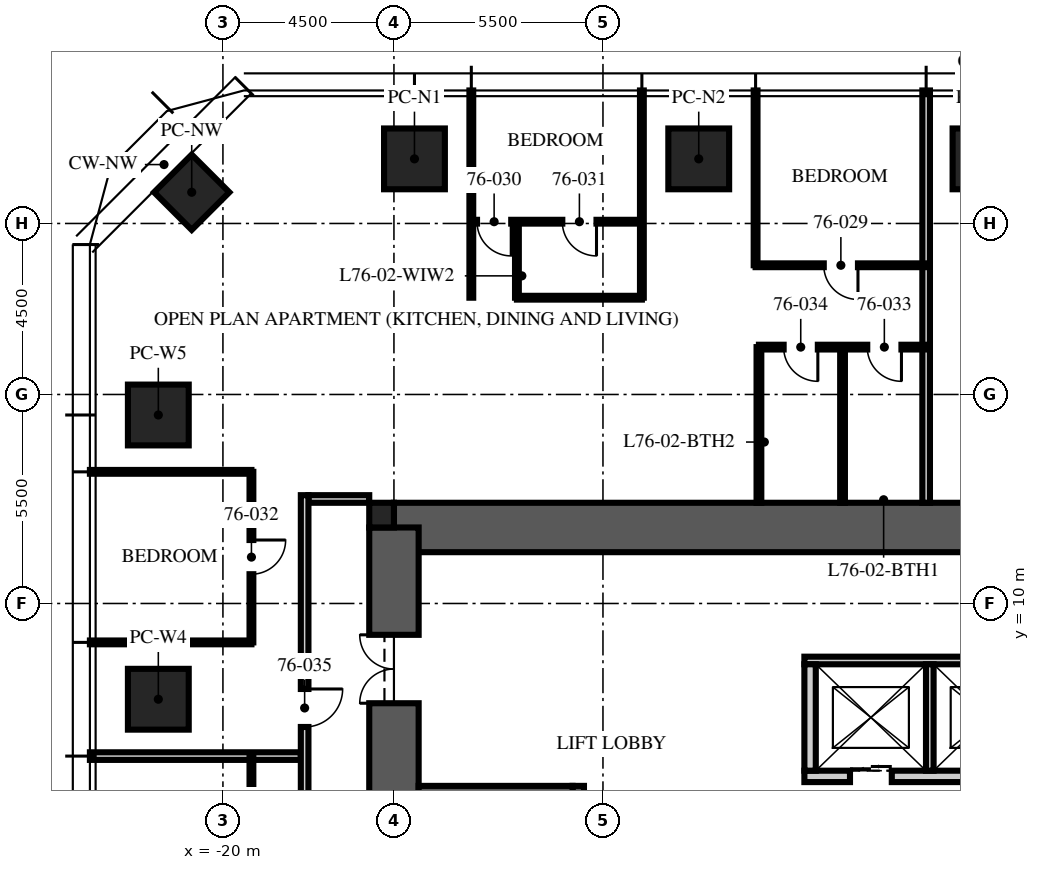
"""IFC4 building model, lengths in metres.
Left out: names, types, materials, properties, quantities, classifications, styles, units other than length and angle.
Written with IfcOpenShell. Run it as: python <this file> out.ifc"""

import sys

from ifc_helpers import new_model, si_unit, direction, frame, frame_2d, origin, origin_2d, place, context, subcontext, project, spatial, rectangle, extrude, element, fill, save


model = new_model("IFC4")
c1 = context("Model", 3, precision=1e-05, world=origin(), true_north=direction((0.0, 1.0)))
c2 = subcontext(c1, "Body", "Model", "MODEL_VIEW")
j1 = project(units=[si_unit("LENGTHUNIT", "METRE"), si_unit("PLANEANGLEUNIT", "RADIAN")], contexts=[c1])
p1 = place(None, origin())
s1 = spatial("IfcSite", under=j1, at=p1, CompositionType="ELEMENT")
p2 = place(p1, origin())
s2 = spatial("IfcBuilding", under=s1, at=p2, CompositionType="ELEMENT")
p3 = place(p2, frame((0.0, 0.0, 304.5)))
s3 = spatial("IfcBuildingStorey", under=s2, at=p3, CompositionType="ELEMENT", Elevation=304.5)
p4 = place(p3, frame((-15.5, 12.0, -0.25), z_axis=(0.0, 0.0, 1.0), x_axis=(1.0, 0.0, 0.0)))
e1 = element("IfcWall", 1, at=p4, inside=s3, PredefinedType="SHEAR", context=c2, shape_type="SweptSolid", body=[
    extrude(rectangle(XDim=31.0, YDim=1.3, at=frame_2d((15.5, 0.0))), origin(), (0.0, 0.0, 1.0), 3.75),
])
p5 = place(p3, frame((-15.5, -12.0, -0.25), z_axis=(0.0, 0.0, 1.0), x_axis=(0.0, 1.0, 0.0)))
e2 = element("IfcWall", 2, at=p5, inside=s3, PredefinedType="SHEAR", context=c2, shape_type="SweptSolid", body=[
    extrude(rectangle(XDim=24.0, YDim=1.3, at=frame_2d((12.0, 0.0))), origin(), (0.0, 0.0, 1.0), 3.75),
])
p6 = place(p5, frame((3.125, 0.0, 0.25)))
e3 = element("IfcOpeningElement", 3, at=p6, cuts=e2, PredefinedType="OPENING", context=c2, shape_type="SweptSolid", body=[
    extrude(rectangle(XDim=1.2, YDim=2.1, at=frame_2d((0.6, 1.05))), frame((0.0, 0.66, 0.0), z_axis=(0.0, -1.0, 0.0), x_axis=(1.0, 0.0, 0.0)), (0.0, 0.0, 1.0), 1.32),
])
p7 = place(p5, frame((19.375, 0.0, 0.25)))
e4 = element("IfcOpeningElement", 4, at=p7, cuts=e2, PredefinedType="OPENING", context=c2, shape_type="SweptSolid", body=[
    extrude(rectangle(XDim=1.8, YDim=2.1, at=frame_2d((0.9, 1.05))), frame((0.0, 0.66, 0.0), z_axis=(0.0, -1.0, 0.0), x_axis=(1.0, 0.0, 0.0)), (0.0, 0.0, 1.0), 1.32),
])
p8 = place(p3, frame((-15.825, 12.325, -0.25), z_axis=(0.0, 0.0, 1.0), x_axis=(1.0, 0.0, 0.0)))
e5 = element("IfcColumn", 5, at=p8, inside=s3, PredefinedType="COLUMN", context=c2, shape_type="SweptSolid", body=[
    extrude(rectangle(XDim=0.65, YDim=0.65, at=origin_2d()), origin(), (0.0, 0.0, 1.0), 3.75),
])
for number, where, z_axis, x_axis in (
    (6, (-14.96, 21.7, 0.0), (0.0, 0.0, 1.0), (1.0, 0.0, 0.0)),
    (7, (-7.48, 21.7, 0.0), (0.0, 0.0, 1.0), (1.0, 0.0, 0.0)),
    (8, (0.0, 21.7, 0.0), (0.0, 0.0, 1.0), (1.0, 0.0, 0.0)),
    (9, (-21.7, 7.48, 0.0), (0.0, 0.0, 1.0), (0.0, 1.0, 0.0)),
    (10, (-21.7, 14.96, 0.0), (0.0, 0.0, 1.0), (0.0, 1.0, 0.0)),
):
    element("IfcColumn", number, at=place(p3, frame(where, z_axis=z_axis, x_axis=x_axis)), inside=s3, PredefinedType="COLUMN", context=c2, shape_type="SweptSolid", body=[
        extrude(rectangle(XDim=1.6, YDim=1.6, at=origin_2d()), origin(), (0.0, 0.0, 1.0), 3.75),
    ])
p9 = place(p3, frame((-20.821, 20.821, 0.0), z_axis=(0.0, 0.0, 1.0), x_axis=(0.707106781187, 0.707106781187, 0.0)))
e11 = element("IfcColumn", 11, at=p9, inside=s3, PredefinedType="COLUMN", context=c2, shape_type="SweptSolid", body=[
    extrude(rectangle(XDim=1.4, YDim=1.4, at=origin_2d()), origin(), (0.0, 0.0, 1.0), 3.75),
])
p10 = place(p3, frame((-10.65, -4.9, 0.0), z_axis=(0.0, 0.0, 1.0), x_axis=(0.0, 1.0, 0.0)))
e12 = element("IfcWall", 12, at=p10, inside=s3, PredefinedType="SOLIDWALL", context=c2, shape_type="SweptSolid", body=[
    extrude(rectangle(XDim=10.1, YDim=0.3, at=frame_2d((5.05, 0.0))), origin(), (0.0, 0.0, 1.0), 3.5),
])
p11 = place(p3, frame((-14.85, 5.05, 0.0), z_axis=(0.0, 0.0, 1.0), x_axis=(1.0, 0.0, 0.0)))
e13 = element("IfcWall", 13, at=p11, inside=s3, PredefinedType="SOLIDWALL", context=c2, shape_type="SweptSolid", body=[
    extrude(rectangle(XDim=4.05, YDim=0.3, at=frame_2d((2.025, 0.0))), origin(), (0.0, 0.0, 1.0), 3.5),
])
p12 = place(p3, frame((-4.7, 5.45, 0.0), z_axis=(0.0, 0.0, 1.0), x_axis=(1.0, 0.0, 0.0)))
e14 = element("IfcWall", 14, at=p12, inside=s3, PredefinedType="PARTITIONING", context=c2, shape_type="SweptSolid", body=[
    extrude(rectangle(XDim=9.7, YDim=0.3, at=frame_2d((4.85, 0.0))), origin(), (0.0, 0.0, 1.0), 3.5),
])
p13 = place(p12, frame((1.2, 0.0, 0.0)))
e15 = element("IfcOpeningElement", 15, at=p13, cuts=e14, PredefinedType="OPENING", context=c2, shape_type="SweptSolid", body=[
    extrude(rectangle(XDim=1.1, YDim=2.1, at=frame_2d((0.55, 1.05))), frame((0.0, 0.16, 0.0), z_axis=(0.0, -1.0, 0.0), x_axis=(1.0, 0.0, 0.0)), (0.0, 0.0, 1.0), 0.32),
])
p14 = place(p12, frame((4.3, 0.0, 0.0)))
e16 = element("IfcOpeningElement", 16, at=p14, cuts=e14, PredefinedType="OPENING", context=c2, shape_type="SweptSolid", body=[
    extrude(rectangle(XDim=1.1, YDim=2.1, at=frame_2d((0.55, 1.05))), frame((0.0, 0.16, 0.0), z_axis=(0.0, -1.0, 0.0), x_axis=(1.0, 0.0, 0.0)), (0.0, 0.0, 1.0), 0.32),
])
p15 = place(p12, frame((7.4, 0.0, 0.0)))
e17 = element("IfcOpeningElement", 17, at=p15, cuts=e14, PredefinedType="OPENING", context=c2, shape_type="SweptSolid", body=[
    extrude(rectangle(XDim=1.1, YDim=2.1, at=frame_2d((0.55, 1.05))), frame((0.0, 0.16, 0.0), z_axis=(0.0, -1.0, 0.0), x_axis=(1.0, 0.0, 0.0)), (0.0, 0.0, 1.0), 0.32),
])
p16 = place(p3, frame((-4.7, 8.5, 0.0), z_axis=(0.0, 0.0, 1.0), x_axis=(1.0, 0.0, 0.0)))
e18 = element("IfcWall", 18, at=p16, inside=s3, PredefinedType="PARTITIONING", context=c2, shape_type="SweptSolid", body=[
    extrude(rectangle(XDim=9.7, YDim=0.2, at=frame_2d((4.85, 0.0))), origin(), (0.0, 0.0, 1.0), 3.5),
])
p17 = place(p3, frame((-4.55, 5.6, 0.0), z_axis=(0.0, 0.0, 1.0), x_axis=(0.0, 1.0, 0.0)))
e19 = element("IfcWall", 19, at=p17, inside=s3, PredefinedType="PARTITIONING", context=c2, shape_type="SweptSolid", body=[
    extrude(rectangle(XDim=2.8, YDim=0.3, at=frame_2d((1.4, 0.0))), origin(), (0.0, 0.0, 1.0), 3.5),
])
p18 = place(p3, frame((-1.4, 5.6, 0.0), z_axis=(0.0, 0.0, 1.0), x_axis=(0.0, 1.0, 0.0)))
e20 = element("IfcWall", 20, at=p18, inside=s3, PredefinedType="PARTITIONING", context=c2, shape_type="SweptSolid", body=[
    extrude(rectangle(XDim=2.8, YDim=0.2, at=frame_2d((1.4, 0.0))), origin(), (0.0, 0.0, 1.0), 3.5),
])
p19 = place(p3, frame((-16.15, 12.75, 0.0), z_axis=(0.0, 0.0, 1.0), x_axis=(-1.0, 0.0, 0.0)))
e21 = element("IfcWall", 21, at=p19, inside=s3, PredefinedType="PARTITIONING", context=c2, shape_type="SweptSolid", body=[
    extrude(rectangle(XDim=1.6, YDim=0.2, at=frame_2d((0.8, 0.0))), origin(), (0.0, 0.0, 1.0), 2.6),
])
p20 = place(p3, frame((-1.496, 12.65, 0.0), z_axis=(0.0, 0.0, 1.0), x_axis=(0.0, 1.0, 0.0)))
e22 = element("IfcWall", 22, at=p20, inside=s3, PredefinedType="PARTITIONING", context=c2, shape_type="SweptSolid", body=[
    extrude(rectangle(XDim=10.85, YDim=0.2, at=frame_2d((5.425, 0.0))), origin(), (0.0, 0.0, 1.0), 3.01),
])
p21 = place(p3, frame((-5.984, 18.9, 0.0), z_axis=(0.0, 0.0, 1.0), x_axis=(0.0, 1.0, 0.0)))
e23 = element("IfcWall", 23, at=p21, inside=s3, PredefinedType="PARTITIONING", context=c2, shape_type="SweptSolid", body=[
    extrude(rectangle(XDim=4.6, YDim=0.1, at=frame_2d((2.3, 0.0))), origin(), (0.0, 0.0, 1.0), 3.01),
])
for number, where, z_axis, x_axis in (
    (24, (-8.976, 18.046, 0.0), (0.0, 0.0, 1.0), (0.0, 1.0, 0.0)),
    (25, (-13.464, 18.046, 0.0), (0.0, 0.0, 1.0), (0.0, 1.0, 0.0)),
):
    element("IfcWall", number, at=place(p3, frame(where, z_axis=z_axis, x_axis=x_axis)), inside=s3, PredefinedType="PARTITIONING", context=c2, shape_type="SweptSolid", body=[
        extrude(rectangle(XDim=5.454, YDim=0.1, at=frame_2d((2.727, 0.0))), origin(), (0.0, 0.0, 1.0), 3.01),
    ])
for number, where, z_axis, x_axis in (
    (26, (-19.25, 13.464, 0.0), (0.0, 0.0, 1.0), (-1.0, 0.0, 0.0)),
    (27, (-19.25, 8.976, 0.0), (0.0, 0.0, 1.0), (-1.0, 0.0, 0.0)),
):
    element("IfcWall", number, at=place(p3, frame(where, z_axis=z_axis, x_axis=x_axis)), inside=s3, PredefinedType="PARTITIONING", context=c2, shape_type="SweptSolid", body=[
        extrude(rectangle(XDim=4.25, YDim=0.1, at=frame_2d((2.125, 0.0))), origin(), (0.0, 0.0, 1.0), 3.01),
    ])
p22 = place(p3, frame((-17.95, 5.984, 0.0), z_axis=(0.0, 0.0, 1.0), x_axis=(-1.0, 0.0, 0.0)))
e28 = element("IfcWall", 28, at=p22, inside=s3, PredefinedType="PARTITIONING", context=c2, shape_type="SweptSolid", body=[
    extrude(rectangle(XDim=5.55, YDim=0.2, at=frame_2d((2.775, 0.0))), origin(), (0.0, 0.0, 1.0), 3.01),
])
p23 = place(p3, frame((-1.496, 18.9, 0.0), z_axis=(0.0, 0.0, 1.0), x_axis=(-1.0, 0.0, 0.0)))
e29 = element("IfcWall", 29, at=p23, inside=s3, PredefinedType="PARTITIONING", context=c2, shape_type="SweptSolid", body=[
    extrude(rectangle(XDim=4.488, YDim=0.1, at=frame_2d((2.244, 0.0))), origin(), (0.0, 0.0, 1.0), 2.91),
])
p24 = place(p23, frame((1.794, 0.0, 0.0)))
e30 = element("IfcOpeningElement", 30, at=p24, cuts=e29, PredefinedType="OPENING", context=c2, shape_type="SweptSolid", body=[
    extrude(rectangle(XDim=0.9, YDim=2.1, at=frame_2d((0.45, 1.05))), frame((0.0, 0.06, 0.0), z_axis=(0.0, -1.0, 0.0), x_axis=(1.0, 0.0, 0.0)), (0.0, 0.0, 1.0), 0.12),
])
p25 = place(p3, frame((-8.976, 20.046, 0.0), z_axis=(0.0, 0.0, 1.0), x_axis=(-1.0, 0.0, 0.0)))
e31 = element("IfcWall", 31, at=p25, inside=s3, PredefinedType="PARTITIONING", context=c2, shape_type="SweptSolid", body=[
    extrude(rectangle(XDim=4.488, YDim=0.1, at=frame_2d((2.244, 0.0))), origin(), (0.0, 0.0, 1.0), 2.91),
])
p26 = place(p25, frame((3.438, 0.0, 0.0)))
e32 = element("IfcOpeningElement", 32, at=p26, cuts=e31, PredefinedType="OPENING", context=c2, shape_type="SweptSolid", body=[
    extrude(rectangle(XDim=0.9, YDim=2.1, at=frame_2d((0.45, 1.05))), frame((0.0, 0.06, 0.0), z_axis=(0.0, -1.0, 0.0), x_axis=(1.0, 0.0, 0.0)), (0.0, 0.0, 1.0), 0.12),
])
p27 = place(p25, frame((1.194, 0.0, 0.0)))
e33 = element("IfcOpeningElement", 33, at=p27, cuts=e31, PredefinedType="OPENING", context=c2, shape_type="SweptSolid", body=[
    extrude(rectangle(XDim=0.9, YDim=2.1, at=frame_2d((0.45, 1.05))), frame((0.0, 0.06, 0.0), z_axis=(0.0, -1.0, 0.0), x_axis=(1.0, 0.0, 0.0)), (0.0, 0.0, 1.0), 0.12),
])
p28 = place(p3, frame((-12.264, 18.046, 0.0), z_axis=(0.0, 0.0, 1.0), x_axis=(0.0, 1.0, 0.0)))
e34 = element("IfcWall", 34, at=p28, inside=s3, PredefinedType="PARTITIONING", context=c2, shape_type="SweptSolid", body=[
    extrude(rectangle(XDim=2.0, YDim=0.1, at=frame_2d((1.0, 0.0))), origin(), (0.0, 0.0, 1.0), 3.5),
])
p29 = place(p3, frame((-8.976, 18.046, 0.0), z_axis=(0.0, 0.0, 1.0), x_axis=(-1.0, 0.0, 0.0)))
e35 = element("IfcWall", 35, at=p29, inside=s3, PredefinedType="PARTITIONING", context=c2, shape_type="SweptSolid", body=[
    extrude(rectangle(XDim=3.288, YDim=0.1, at=frame_2d((1.644, 0.0))), origin(), (0.0, 0.0, 1.0), 2.91),
])
p30 = place(p3, frame((-19.25, 13.464, 0.0), z_axis=(0.0, 0.0, 1.0), x_axis=(0.0, -1.0, 0.0)))
e36 = element("IfcWall", 36, at=p30, inside=s3, PredefinedType="PARTITIONING", context=c2, shape_type="SweptSolid", body=[
    extrude(rectangle(XDim=4.488, YDim=0.1, at=frame_2d((2.244, 0.0))), origin(), (0.0, 0.0, 1.0), 2.91),
])
p31 = place(p30, frame((1.794, 0.0, 0.0)))
e37 = element("IfcOpeningElement", 37, at=p31, cuts=e36, PredefinedType="OPENING", context=c2, shape_type="SweptSolid", body=[
    extrude(rectangle(XDim=0.9, YDim=2.1, at=frame_2d((0.45, 1.05))), frame((0.0, 0.06, 0.0), z_axis=(0.0, -1.0, 0.0), x_axis=(1.0, 0.0, 0.0)), (0.0, 0.0, 1.0), 0.12),
])
p32 = place(p3, frame((-1.496, 16.746, 0.0), z_axis=(0.0, 0.0, 1.0), x_axis=(-1.0, 0.0, 0.0)))
e38 = element("IfcWall", 38, at=p32, inside=s3, PredefinedType="PARTITIONING", context=c2, shape_type="SweptSolid", body=[
    extrude(rectangle(XDim=4.4, YDim=0.125, at=frame_2d((2.2, 0.0))), origin(), (0.0, 0.0, 1.0), 2.91),
])
p33 = place(p32, frame((0.65, 0.0, 0.0)))
e39 = element("IfcOpeningElement", 39, at=p33, cuts=e38, PredefinedType="OPENING", context=c2, shape_type="SweptSolid", body=[
    extrude(rectangle(XDim=0.9, YDim=2.1, at=frame_2d((0.45, 1.05))), frame((0.0, 0.073, 0.0), z_axis=(0.0, -1.0, 0.0), x_axis=(1.0, 0.0, 0.0)), (0.0, 0.0, 1.0), 0.145),
])
p34 = place(p32, frame((2.85, 0.0, 0.0)))
e40 = element("IfcOpeningElement", 40, at=p34, cuts=e38, PredefinedType="OPENING", context=c2, shape_type="SweptSolid", body=[
    extrude(rectangle(XDim=0.9, YDim=2.1, at=frame_2d((0.45, 1.05))), frame((0.0, 0.073, 0.0), z_axis=(0.0, -1.0, 0.0), x_axis=(1.0, 0.0, 0.0)), (0.0, 0.0, 1.0), 0.145),
])
p35 = place(p3, frame((-3.696, 12.65, 0.0), z_axis=(0.0, 0.0, 1.0), x_axis=(0.0, 1.0, 0.0)))
e41 = element("IfcWall", 41, at=p35, inside=s3, PredefinedType="PARTITIONING", context=c2, shape_type="SweptSolid", body=[
    extrude(rectangle(XDim=4.096, YDim=0.125, at=frame_2d((2.048, 0.0))), origin(), (0.0, 0.0, 1.0), 2.91),
])
p36 = place(p3, frame((-5.896, 12.65, 0.0), z_axis=(0.0, 0.0, 1.0), x_axis=(0.0, 1.0, 0.0)))
e42 = element("IfcWall", 42, at=p36, inside=s3, PredefinedType="PARTITIONING", context=c2, shape_type="SweptSolid", body=[
    extrude(rectangle(XDim=4.096, YDim=0.125, at=frame_2d((2.048, 0.0))), origin(), (0.0, 0.0, 1.0), 3.5),
])
p37 = place(p3, frame((-19.25, 5.984, 0.0), z_axis=(0.0, 0.0, 1.0), x_axis=(0.0, -1.0, 0.0)))
e43 = element("IfcWall", 43, at=p37, inside=s3, PredefinedType="PARTITIONING", context=c2, shape_type="SweptSolid", body=[
    extrude(rectangle(XDim=4.488, YDim=0.1, at=frame_2d((2.244, 0.0))), origin(), (0.0, 0.0, 1.0), 2.91),
])
p38 = place(p37, frame((1.794, 0.0, 0.0)))
e44 = element("IfcOpeningElement", 44, at=p38, cuts=e43, PredefinedType="OPENING", context=c2, shape_type="SweptSolid", body=[
    extrude(rectangle(XDim=0.9, YDim=2.1, at=frame_2d((0.45, 1.05))), frame((0.0, 0.06, 0.0), z_axis=(0.0, -1.0, 0.0), x_axis=(1.0, 0.0, 0.0)), (0.0, 0.0, 1.0), 0.12),
])
p39 = place(p3, frame((-17.85, 12.85, 0.0), z_axis=(0.0, 0.0, 1.0), x_axis=(0.0, -1.0, 0.0)))
e45 = element("IfcWall", 45, at=p39, inside=s3, PredefinedType="PARTITIONING", context=c2, shape_type="SweptSolid", body=[
    extrude(rectangle(XDim=25.7, YDim=0.2, at=frame_2d((12.85, 0.0))), origin(), (0.0, 0.0, 1.0), 2.9),
])
p40 = place(p39, frame((5.1, 0.0, 0.0)))
e46 = element("IfcOpeningElement", 46, at=p40, cuts=e45, PredefinedType="OPENING", context=c2, shape_type="SweptSolid", body=[
    extrude(rectangle(XDim=1.0, YDim=2.2, at=frame_2d((0.5, 1.1))), frame((0.0, 0.11, 0.0), z_axis=(0.0, -1.0, 0.0), x_axis=(1.0, 0.0, 0.0)), (0.0, 0.0, 1.0), 0.22),
])
p41 = place(p39, frame((23.386, 0.0, 0.0)))
e47 = element("IfcOpeningElement", 47, at=p41, cuts=e45, PredefinedType="OPENING", context=c2, shape_type="SweptSolid", body=[
    extrude(rectangle(XDim=1.0, YDim=2.2, at=frame_2d((0.5, 1.1))), frame((0.0, 0.11, 0.0), z_axis=(0.0, -1.0, 0.0), x_axis=(1.0, 0.0, 0.0)), (0.0, 0.0, 1.0), 0.22),
])
p42 = place(p7, origin())
e48 = element("IfcDoor", 48, at=p42, inside=s3, OperationType="DOUBLE_DOOR_SINGLE_SWING", PredefinedType="DOOR", context=c2, shape_type="SweptSolid", body=[
    extrude(rectangle(XDim=1.8, YDim=2.1, at=frame_2d((0.9, 1.05))), frame((0.0, 0.025, 0.0), z_axis=(0.0, -1.0, 0.0), x_axis=(1.0, 0.0, 0.0)), (0.0, 0.0, 1.0), 0.05),
])
fill(e4, e48)
p43 = place(p13, origin())
e49 = element("IfcDoor", 49, at=p43, inside=s3, OperationType="DOUBLE_DOOR_SLIDING", PredefinedType="DOOR", context=c2, shape_type="SweptSolid", body=[
    extrude(rectangle(XDim=1.1, YDim=2.1, at=frame_2d((0.55, 1.05))), frame((0.0, 0.025, 0.0), z_axis=(0.0, -1.0, 0.0), x_axis=(1.0, 0.0, 0.0)), (0.0, 0.0, 1.0), 0.05),
])
fill(e15, e49)
p44 = place(p24, origin())
e50 = element("IfcDoor", 50, at=p44, inside=s3, OperationType="SINGLE_SWING_LEFT", PredefinedType="DOOR", context=c2, shape_type="SweptSolid", body=[
    extrude(rectangle(XDim=0.9, YDim=2.1, at=frame_2d((0.45, 1.05))), frame((0.0, 0.025, 0.0), z_axis=(0.0, -1.0, 0.0), x_axis=(1.0, 0.0, 0.0)), (0.0, 0.0, 1.0), 0.05),
])
fill(e30, e50)
p45 = place(p26, origin())
e51 = element("IfcDoor", 51, at=p45, inside=s3, OperationType="SINGLE_SWING_LEFT", PredefinedType="DOOR", context=c2, shape_type="SweptSolid", body=[
    extrude(rectangle(XDim=0.9, YDim=2.1, at=frame_2d((0.45, 1.05))), frame((0.0, 0.025, 0.0), z_axis=(0.0, -1.0, 0.0), x_axis=(1.0, 0.0, 0.0)), (0.0, 0.0, 1.0), 0.05),
])
fill(e32, e51)
p46 = place(p27, origin())
e52 = element("IfcDoor", 52, at=p46, inside=s3, OperationType="SINGLE_SWING_LEFT", PredefinedType="DOOR", context=c2, shape_type="SweptSolid", body=[
    extrude(rectangle(XDim=0.9, YDim=2.1, at=frame_2d((0.45, 1.05))), frame((0.0, 0.025, 0.0), z_axis=(0.0, -1.0, 0.0), x_axis=(1.0, 0.0, 0.0)), (0.0, 0.0, 1.0), 0.05),
])
fill(e33, e52)
p47 = place(p31, origin())
e53 = element("IfcDoor", 53, at=p47, inside=s3, OperationType="SINGLE_SWING_LEFT", PredefinedType="DOOR", context=c2, shape_type="SweptSolid", body=[
    extrude(rectangle(XDim=0.9, YDim=2.1, at=frame_2d((0.45, 1.05))), frame((0.0, 0.025, 0.0), z_axis=(0.0, -1.0, 0.0), x_axis=(1.0, 0.0, 0.0)), (0.0, 0.0, 1.0), 0.05),
])
fill(e37, e53)
p48 = place(p33, origin())
e54 = element("IfcDoor", 54, at=p48, inside=s3, OperationType="SINGLE_SWING_LEFT", PredefinedType="DOOR", context=c2, shape_type="SweptSolid", body=[
    extrude(rectangle(XDim=0.9, YDim=2.1, at=frame_2d((0.45, 1.05))), frame((0.0, 0.025, 0.0), z_axis=(0.0, -1.0, 0.0), x_axis=(1.0, 0.0, 0.0)), (0.0, 0.0, 1.0), 0.05),
])
fill(e39, e54)
p49 = place(p34, origin())
e55 = element("IfcDoor", 55, at=p49, inside=s3, OperationType="SINGLE_SWING_LEFT", PredefinedType="DOOR", context=c2, shape_type="SweptSolid", body=[
    extrude(rectangle(XDim=0.9, YDim=2.1, at=frame_2d((0.45, 1.05))), frame((0.0, 0.025, 0.0), z_axis=(0.0, -1.0, 0.0), x_axis=(1.0, 0.0, 0.0)), (0.0, 0.0, 1.0), 0.05),
])
fill(e40, e55)
p50 = place(p40, origin())
e56 = element("IfcDoor", 56, at=p50, inside=s3, OperationType="SINGLE_SWING_LEFT", PredefinedType="DOOR", context=c2, shape_type="SweptSolid", body=[
    extrude(rectangle(XDim=1.0, YDim=2.2, at=frame_2d((0.5, 1.1))), frame((0.0, 0.025, 0.0), z_axis=(0.0, -1.0, 0.0), x_axis=(1.0, 0.0, 0.0)), (0.0, 0.0, 1.0), 0.05),
])
fill(e46, e56)
save(model, sys.argv[1])
